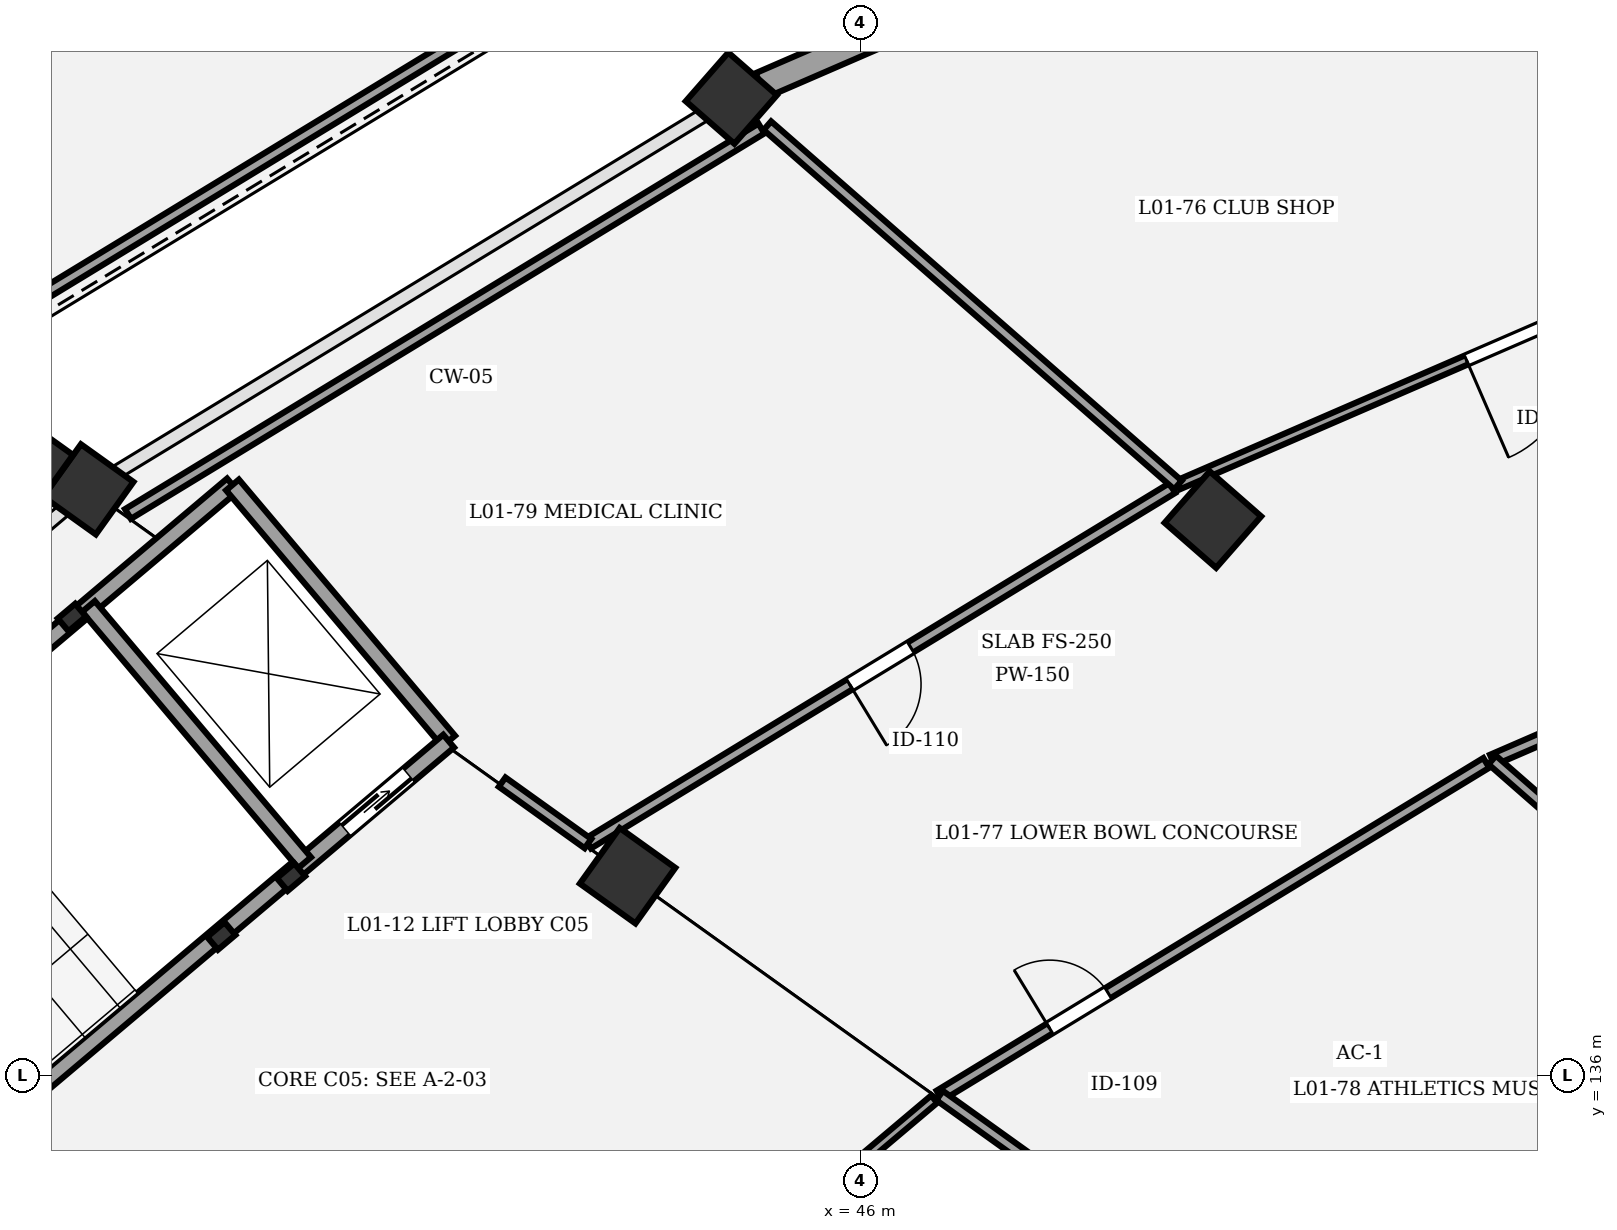
"""IFC4 building model, lengths in metres.
Left out: names, types, materials, properties, quantities, classifications, styles, units other than length and angle.
Written with IfcOpenShell. Run it as: python <this file> out.ifc"""

import sys

from ifc_helpers import new_model, si_unit, direction, frame, frame_2d, origin, origin_2d, place, context, subcontext, project, spatial, rectangle, extrude, element, fill, save


model = new_model("IFC4")
c1 = context("Model", 3, precision=1e-05, world=origin(), true_north=direction((0.0, 1.0)))
c2 = subcontext(c1, "Body", "Model", "MODEL_VIEW")
j1 = project(units=[si_unit("LENGTHUNIT", "METRE"), si_unit("PLANEANGLEUNIT", "RADIAN")], contexts=[c1])
p1 = place(None, origin())
s1 = spatial("IfcSite", under=j1, at=p1, CompositionType="ELEMENT")
p2 = place(p1, origin())
s2 = spatial("IfcBuilding", under=s1, at=p2, CompositionType="ELEMENT")
p3 = place(p2, frame((0.0, 0.0, 5.4)))
s3 = spatial("IfcBuildingStorey", under=s2, at=p3, CompositionType="ELEMENT", Elevation=5.4)
p4 = place(p3, frame((50.64, 143.317, 0.0), z_axis=(0.0, 0.0, 1.0), x_axis=(-0.752529860433, 0.658558128912, 0.0)))
e1 = element("IfcColumn", 1, at=p4, inside=s3, PredefinedType="COLUMN", context=c2, shape_type="SweptSolid", body=[
    extrude(rectangle(XDim=0.9, YDim=0.9, at=origin_2d()), origin(), (0.0, 0.0, 1.0), 4.8),
])
p5 = place(p3, frame((44.304, 148.861, 0.0), z_axis=(0.0, 0.0, 1.0), x_axis=(-0.752529860433, 0.658558128912, 0.0)))
e2 = element("IfcColumn", 2, at=p5, inside=s3, PredefinedType="COLUMN", context=c2, shape_type="SweptSolid", body=[
    extrude(rectangle(XDim=0.85, YDim=0.85, at=origin_2d()), origin(), (0.0, 0.0, 1.0), 4.8),
])
p6 = place(p3, frame((42.939, 138.632, 0.0), z_axis=(0.0, 0.0, 1.0), x_axis=(-0.812897512265, 0.582406760395, 0.0)))
e3 = element("IfcColumn", 3, at=p6, inside=s3, PredefinedType="COLUMN", context=c2, shape_type="SweptSolid", body=[
    extrude(rectangle(XDim=0.9, YDim=0.9, at=origin_2d()), origin(), (0.0, 0.0, 1.0), 4.8),
])
p7 = place(p3, frame((35.844, 143.715, 0.0), z_axis=(0.0, 0.0, 1.0), x_axis=(-0.812897512265, 0.582406760395, 0.0)))
e4 = element("IfcColumn", 4, at=p7, inside=s3, PredefinedType="COLUMN", context=c2, shape_type="SweptSolid", body=[
    extrude(rectangle(XDim=0.85, YDim=0.85, at=origin_2d()), origin(), (0.0, 0.0, 1.0), 4.8),
])
p8 = place(p3, frame((35.354, 144.066, 0.0), z_axis=(0.0, 0.0, 1.0), x_axis=(-0.582406760395, -0.812897512265, 0.0)))
e5 = element("IfcColumn", 5, at=p8, inside=s3, PredefinedType="PILASTER", context=c2, shape_type="SweptSolid", body=[
    extrude(rectangle(XDim=0.5, YDim=0.35, at=origin_2d()), origin(), (0.0, 0.0, 1.0), 4.8),
])
p9 = place(p3, frame((44.692, 149.029, 0.0), z_axis=(0.0, 0.0, 1.0), x_axis=(0.91749374913, 0.397750198375, 0.0)))
e6 = element("IfcWall", 6, at=p9, inside=s3, PredefinedType="STANDARD", context=c2, shape_type="SweptSolid", body=[
    extrude(rectangle(XDim=9.79, YDim=0.35, at=frame_2d((4.895, 0.0))), origin(), (0.0, 0.0, 1.0), 3.57),
])
p10 = place(p9, frame((3.995, 0.0, 0.0)))
e7 = element("IfcOpeningElement", 7, at=p10, cuts=e6, PredefinedType="OPENING", context=c2, shape_type="SweptSolid", body=[
    extrude(rectangle(XDim=1.8, YDim=2.4, at=frame_2d((0.9, 1.2))), frame((0.0, 0.185, 0.0), z_axis=(0.0, -1.0, 0.0), x_axis=(1.0, 0.0, 0.0)), (0.0, 0.0, 1.0), 0.37),
])
for number, where, z_axis, x_axis in (
    (8, (37.593, 137.839, 0.0), (0.0, 0.0, 1.0), (0.764, 0.645, 0.0)),
    (9, (38.51, 138.613, 0.0), (0.0, 0.0, 1.0), (0.764, 0.645, 0.0)),
    (10, (35.627, 142.029, 0.0), (0.0, 0.0, 1.0), (0.764, 0.645, 0.0)),
):
    element("IfcColumn", number, at=place(p3, frame(where, z_axis=z_axis, x_axis=x_axis)), inside=s3, PredefinedType="COLUMN", context=c2, shape_type="SweptSolid", body=[
        extrude(rectangle(XDim=0.3, YDim=0.22, at=origin_2d()), origin(), (0.0, 0.0, 1.0), 4.8),
    ])
p11 = place(p3, frame((29.319, 136.666, 0.0), z_axis=(0.0, 0.0, 1.0), x_axis=(0.764247804305, 0.644922703598, 0.0)))
e11 = element("IfcWall", 11, at=p11, inside=s3, PredefinedType="SHEAR", context=c2, shape_type="SweptSolid", body=[
    extrude(rectangle(XDim=11.02, YDim=0.22, at=frame_2d((5.51, 0.0))), origin(), (0.0, 0.0, 1.0), 4.55),
])
p12 = place(p3, frame((40.585, 140.403, 0.0), z_axis=(0.0, 0.0, 1.0), x_axis=(-0.644936622785, 0.764236058159, 0.0)))
e12 = element("IfcWall", 12, at=p12, inside=s3, PredefinedType="SHEAR", context=c2, shape_type="SweptSolid", body=[
    extrude(rectangle(XDim=4.41, YDim=0.22, at=frame_2d((2.205, 0.0))), origin(), (0.0, 0.0, 1.0), 4.55),
])
p13 = place(p3, frame((32.163, 133.296, 0.0), z_axis=(0.0, 0.0, 1.0), x_axis=(0.764257018762, 0.644911784102, 0.0)))
e13 = element("IfcWall", 13, at=p13, inside=s3, PredefinedType="SHEAR", context=c2, shape_type="SweptSolid", body=[
    extrude(rectangle(XDim=11.02, YDim=0.22, at=frame_2d((5.51, 0.0))), origin(), (0.0, 0.0, 1.0), 4.55),
])
p14 = place(p13, frame((0.3, 0.0, 0.0)))
e14 = element("IfcOpeningElement", 14, at=p14, cuts=e13, PredefinedType="OPENING", context=c2, shape_type="SweptSolid", body=[
    extrude(rectangle(XDim=1.15, YDim=2.15, at=frame_2d((0.575, 1.075))), frame((0.0, 0.12, 0.0), z_axis=(0.0, -1.0, 0.0), x_axis=(1.0, 0.0, 0.0)), (0.0, 0.0, 1.0), 0.24),
])
p15 = place(p13, frame((9.23, 0.0, 0.0)))
e15 = element("IfcOpeningElement", 15, at=p15, cuts=e13, PredefinedType="OPENING", context=c2, shape_type="SweptSolid", body=[
    extrude(rectangle(XDim=1.1, YDim=2.15, at=frame_2d((0.55, 1.075))), frame((0.0, 0.12, 0.0), z_axis=(0.0, -1.0, 0.0), x_axis=(1.0, 0.0, 0.0)), (0.0, 0.0, 1.0), 0.24),
])
p16 = place(p3, frame((38.689, 138.803, 0.0), z_axis=(0.0, 0.0, 1.0), x_axis=(-0.644904288042, 0.764263344185, 0.0)))
e16 = element("IfcWall", 16, at=p16, inside=s3, PredefinedType="SHEAR", context=c2, shape_type="SweptSolid", body=[
    extrude(rectangle(XDim=4.41, YDim=0.22, at=frame_2d((2.205, 0.0))), origin(), (0.0, 0.0, 1.0), 4.55),
])
p17 = place(p3, frame((54.315, 140.154, 0.0), z_axis=(0.0, 0.0, 1.0), x_axis=(0.917494590455, 0.397748257677, 0.0)))
e17 = element("IfcWall", 17, at=p17, inside=s3, PredefinedType="PARTITIONING", context=c2, shape_type="SweptSolid", body=[
    extrude(rectangle(XDim=9.049, YDim=0.15, at=frame_2d((4.525, 0.0))), origin(), (0.0, 0.0, 1.0), 3.55),
])
p18 = place(p17, frame((1.738, 0.0, 0.0)))
e18 = element("IfcOpeningElement", 18, at=p18, cuts=e17, PredefinedType="OPENING", context=c2, shape_type="SweptSolid", body=[
    extrude(rectangle(XDim=1.32, YDim=2.3, at=frame_2d((0.66, 1.15))), frame((0.0, 0.085, 0.0), z_axis=(0.0, -1.0, 0.0), x_axis=(1.0, 0.0, 0.0)), (0.0, 0.0, 1.0), 0.17),
])
p19 = place(p3, frame((59.054, 147.619, 0.0), z_axis=(0.0, 0.0, 1.0), x_axis=(-0.917508957037, -0.39771511633, 0.0)))
e19 = element("IfcWall", 19, at=p19, inside=s3, PredefinedType="PARTITIONING", context=c2, shape_type="SweptSolid", body=[
    extrude(rectangle(XDim=9.671, YDim=0.125, at=frame_2d((4.836, 0.0))), origin(), (0.0, 0.0, 1.0), 3.55),
])
p20 = place(p19, frame((4.136, 0.0, 0.0)))
e20 = element("IfcOpeningElement", 20, at=p20, cuts=e19, PredefinedType="OPENING", context=c2, shape_type="SweptSolid", body=[
    extrude(rectangle(XDim=1.4, YDim=2.3, at=frame_2d((0.7, 1.15))), frame((0.0, 0.073, 0.0), z_axis=(0.0, -1.0, 0.0), x_axis=(1.0, 0.0, 0.0)), (0.0, 0.0, 1.0), 0.145),
])
p21 = place(p3, frame((47.043, 135.74, 0.0), z_axis=(0.0, 0.0, 1.0), x_axis=(0.854330104408, 0.519730769439, 0.0)))
e21 = element("IfcWall", 21, at=p21, inside=s3, PredefinedType="PARTITIONING", context=c2, shape_type="SweptSolid", body=[
    extrude(rectangle(XDim=8.42, YDim=0.15, at=frame_2d((4.21, 0.0))), origin(), (0.0, 0.0, 1.0), 3.55),
])
p22 = place(p21, frame((1.696, 0.0, 0.0)))
e22 = element("IfcOpeningElement", 22, at=p22, cuts=e21, PredefinedType="OPENING", context=c2, shape_type="SweptSolid", body=[
    extrude(rectangle(XDim=0.9, YDim=2.1, at=frame_2d((0.45, 1.05))), frame((0.0, 0.085, 0.0), z_axis=(0.0, -1.0, 0.0), x_axis=(1.0, 0.0, 0.0)), (0.0, 0.0, 1.0), 0.17),
])
p23 = place(p3, frame((50.105, 143.731, 0.0), z_axis=(0.0, 0.0, 1.0), x_axis=(-0.854321649351, -0.519744667554, 0.0)))
e23 = element("IfcWall", 23, at=p23, inside=s3, PredefinedType="PARTITIONING", context=c2, shape_type="SweptSolid", body=[
    extrude(rectangle(XDim=8.999, YDim=0.15, at=frame_2d((4.499, 0.0))), origin(), (0.0, 0.0, 1.0), 3.55),
])
p24 = place(p23, frame((4.029, 0.0, 0.0)))
e24 = element("IfcOpeningElement", 24, at=p24, cuts=e23, PredefinedType="OPENING", context=c2, shape_type="SweptSolid", body=[
    extrude(rectangle(XDim=0.94, YDim=2.1, at=frame_2d((0.47, 1.05))), frame((0.0, 0.085, 0.0), z_axis=(0.0, -1.0, 0.0), x_axis=(1.0, 0.0, 0.0)), (0.0, 0.0, 1.0), 0.17),
])
p25 = place(p3, frame((40.867, 130.539, 0.0), z_axis=(0.0, 0.0, 1.0), x_axis=(0.764249122867, 0.644921141068, 0.0)))
e25 = element("IfcWall", 25, at=p25, inside=s3, PredefinedType="PARTITIONING", context=c2, shape_type="SweptSolid", body=[
    extrude(rectangle(XDim=7.99, YDim=0.125, at=frame_2d((3.995, 0.0))), origin(), (0.0, 0.0, 1.0), 3.55),
])
p26 = place(p25, frame((1.594, 0.0, 0.0)))
e26 = element("IfcOpeningElement", 26, at=p26, cuts=e25, PredefinedType="OPENING", context=c2, shape_type="SweptSolid", body=[
    extrude(rectangle(XDim=0.98, YDim=2.1, at=frame_2d((0.49, 1.05))), frame((0.0, 0.073, 0.0), z_axis=(0.0, -1.0, 0.0), x_axis=(1.0, 0.0, 0.0)), (0.0, 0.0, 1.0), 0.145),
])
p27 = place(p3, frame((58.96, 136.089, 0.0), z_axis=(0.0, 0.0, 1.0), x_axis=(-0.752571794077, 0.658510208546, 0.0)))
e27 = element("IfcWall", 27, at=p27, inside=s3, PredefinedType="PARTITIONING", context=c2, shape_type="SweptSolid", body=[
    extrude(rectangle(XDim=6.172, YDim=0.15, at=frame_2d((3.086, 0.0))), origin(), (0.0, 0.0, 1.0), 3.55),
])
p28 = place(p3, frame((50.18, 143.772, 0.0), z_axis=(0.0, 0.0, 1.0), x_axis=(-0.752576694707, 0.658504607869, 0.0)))
e28 = element("IfcWall", 28, at=p28, inside=s3, PredefinedType="PARTITIONING", context=c2, shape_type="SweptSolid", body=[
    extrude(rectangle(XDim=7.178, YDim=0.15, at=frame_2d((3.589, 0.0))), origin(), (0.0, 0.0, 1.0), 3.55),
])
p29 = place(p3, frame((52.126, 132.098, 0.0), z_axis=(0.0, 0.0, 1.0), x_axis=(-0.812877822405, 0.582434241646, 0.0)))
e29 = element("IfcWall", 29, at=p29, inside=s3, PredefinedType="PARTITIONING", context=c2, shape_type="SweptSolid", body=[
    extrude(rectangle(XDim=6.253, YDim=0.15, at=frame_2d((3.126, 0.0))), origin(), (0.0, 0.0, 1.0), 3.55),
])
p30 = place(p3, frame((59.082, 135.143, 0.0), z_axis=(0.0, 0.0, 1.0), x_axis=(-0.854334410981, -0.519723690257, 0.0)))
e30 = element("IfcWall", 30, at=p30, inside=s3, PredefinedType="PARTITIONING", context=c2, shape_type="SweptSolid", body=[
    extrude(rectangle(XDim=6.8, YDim=0.15, at=frame_2d((3.4, 0.0))), origin(), (0.0, 0.0, 1.0), 3.55),
])
p31 = place(p3, frame((36.365, 143.391, 0.0), z_axis=(0.0, 0.0, 1.0), x_axis=(0.854323689683, 0.519741313777, 0.0)))
e31 = element("IfcWall", 31, at=p31, inside=s3, PredefinedType="PARTITIONING", context=c2, shape_type="SweptSolid", body=[
    extrude(rectangle(XDim=9.756, YDim=0.15, at=frame_2d((4.878, 0.0))), origin(), (0.0, 0.0, 1.0), 3.55),
])
p32 = place(p3, frame((42.418, 139.054, 0.0), z_axis=(0.0, 0.0, 1.0), x_axis=(-0.812925279681, 0.582368001916, 0.0)))
e32 = element("IfcWall", 32, at=p32, inside=s3, PredefinedType="PARTITIONING", context=c2, shape_type="SweptSolid", body=[
    extrude(rectangle(XDim=1.389, YDim=0.15, at=frame_2d((0.695, 0.0))), origin(), (0.0, 0.0, 1.0), 3.55),
])
p33 = place(p3, frame((43.004, 150.997, 0.0), z_axis=(0.0, 0.0, 1.0), x_axis=(-0.854333268174, -0.519725568826, 0.0)))
e33 = element("IfcWall", 33, at=p33, inside=s3, PredefinedType="PARTITIONING", context=c2, shape_type="SweptSolid", body=[
    extrude(rectangle(XDim=9.902, YDim=0.15, at=frame_2d((4.951, 0.0))), origin(), (0.0, 0.0, 1.0), 3.55),
])
p34 = place(p15, origin())
e34 = element("IfcDoor", 34, at=p34, inside=s3, OperationType="DOUBLE_DOOR_SLIDING", PredefinedType="DOOR", context=c2, shape_type="SweptSolid", body=[
    extrude(rectangle(XDim=1.1, YDim=2.15, at=frame_2d((0.55, 1.075))), frame((0.0, 0.025, 0.0), z_axis=(0.0, -1.0, 0.0), x_axis=(1.0, 0.0, 0.0)), (0.0, 0.0, 1.0), 0.05),
])
fill(e15, e34)
p35 = place(p20, origin())
e35 = element("IfcDoor", 35, at=p35, inside=s3, OperationType="SINGLE_SWING_RIGHT", PredefinedType="DOOR", context=c2, shape_type="SweptSolid", body=[
    extrude(rectangle(XDim=1.4, YDim=2.3, at=frame_2d((0.7, 1.15))), frame((0.0, 0.025, 0.0), z_axis=(0.0, -1.0, 0.0), x_axis=(1.0, 0.0, 0.0)), (0.0, 0.0, 1.0), 0.05),
])
fill(e20, e35)
p36 = place(p22, origin())
e36 = element("IfcDoor", 36, at=p36, inside=s3, OperationType="SINGLE_SWING_LEFT", PredefinedType="DOOR", context=c2, shape_type="SweptSolid", body=[
    extrude(rectangle(XDim=0.9, YDim=2.1, at=frame_2d((0.45, 1.05))), frame((0.0, 0.025, 0.0), z_axis=(0.0, -1.0, 0.0), x_axis=(1.0, 0.0, 0.0)), (0.0, 0.0, 1.0), 0.05),
])
fill(e22, e36)
p37 = place(p24, origin())
e37 = element("IfcDoor", 37, at=p37, inside=s3, OperationType="SINGLE_SWING_RIGHT", PredefinedType="DOOR", context=c2, shape_type="SweptSolid", body=[
    extrude(rectangle(XDim=0.94, YDim=2.1, at=frame_2d((0.47, 1.05))), frame((0.0, 0.025, 0.0), z_axis=(0.0, -1.0, 0.0), x_axis=(1.0, 0.0, 0.0)), (0.0, 0.0, 1.0), 0.05),
])
fill(e24, e37)
save(model, sys.argv[1])
